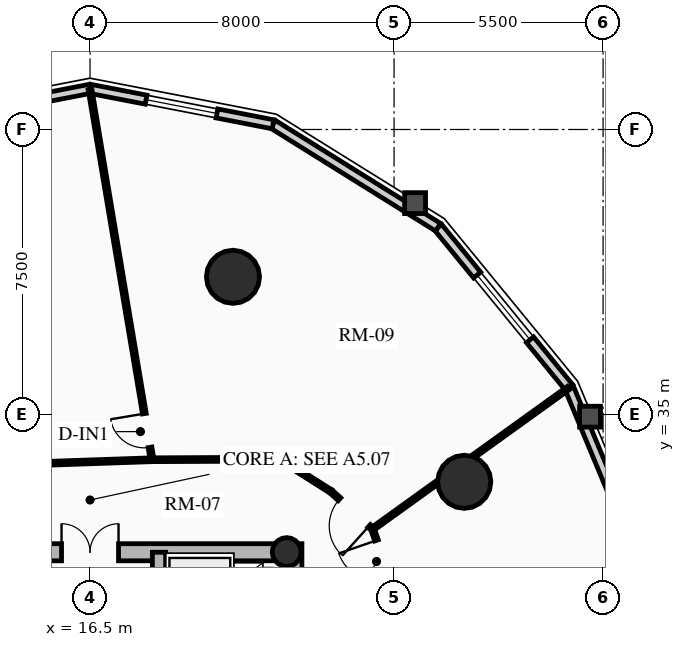
"""IFC4 building model, lengths in metres.
Left out: names, types, materials, properties, quantities, classifications, styles, units other than length and angle.
Written with IfcOpenShell. Run it as: python <this file> out.ifc"""

import sys

from ifc_helpers import new_model, si_unit, direction, frame, frame_2d, origin, origin_2d, place, context, subcontext, project, spatial, rectangle, circle, hollow_circle, extrude, source, transform, mapped, element, fill, save


model = new_model("IFC4")
c1 = context("Model", 3, precision=1e-05, world=origin(), true_north=direction((0.0, 1.0)))
c2 = subcontext(c1, "Body", "Model", "MODEL_VIEW")
j1 = project(units=[si_unit("LENGTHUNIT", "METRE"), si_unit("PLANEANGLEUNIT", "RADIAN")], contexts=[c1])
p1 = place(None, origin())
s1 = spatial("IfcSite", under=j1, at=p1, CompositionType="ELEMENT")
p2 = place(p1, origin())
s2 = spatial("IfcBuilding", under=s1, at=p2, CompositionType="ELEMENT")
p3 = place(p2, frame((0.0, 0.0, 99.25)))
s3 = spatial("IfcBuildingStorey", under=s2, at=p3, CompositionType="ELEMENT", Elevation=99.25)
p4 = place(p3, frame((21.85, 17.4, 0.0), z_axis=(0.0, 0.0, 1.0), x_axis=(0.0, 1.0, 0.0)))
e1 = element("IfcWall", 1, at=p4, inside=s3, PredefinedType="SHEAR", context=c2, shape_type="SweptSolid", body=[
    extrude(rectangle(XDim=14.2, YDim=0.45, at=frame_2d((7.1, 0.0))), origin(), (0.0, 0.0, 1.0), 2.91),
])
p5 = place(p3, frame((11.15, 31.375, 0.0), z_axis=(0.0, 0.0, 1.0), x_axis=(1.0, 0.0, 0.0)))
e2 = element("IfcWall", 2, at=p5, inside=s3, PredefinedType="SHEAR", context=c2, shape_type="SweptSolid", body=[
    extrude(rectangle(XDim=10.7, YDim=0.45, at=frame_2d((5.35, 0.0))), origin(), (0.0, 0.0, 1.0), 2.91),
])
m1 = source(origin(), c2, "Body", "SweptSolid", [
    extrude(rectangle(XDim=1.5, YDim=2.02, at=frame_2d((0.75, 1.01))), frame((0.0, 0.235, 0.0), z_axis=(0.0, -1.0, 0.0), x_axis=(1.0, 0.0, 0.0)), (0.0, 0.0, 1.0), 0.47),
])
p6 = place(p5, frame((4.6, 0.0, 0.0)))
e3 = element("IfcOpeningElement", 3, at=p6, cuts=e2, PredefinedType="OPENING", context=c2, shape_type="MappedRepresentation", body=[
    mapped(m1, transform((0.0, 0.0, 0.0), x_axis=(1.0, 0.0, 0.0), y_axis=(0.0, 1.0, 0.0), z_axis=(0.0, 0.0, 1.0), scale=1.0)),
])
p7 = place(p3, frame((18.315, 17.625, 0.0), z_axis=(0.0, 0.0, 1.0), x_axis=(0.0, 1.0, 0.0)))
e4 = element("IfcWall", 4, at=p7, inside=s3, PredefinedType="SHEAR", context=c2, shape_type="SweptSolid", body=[
    extrude(rectangle(XDim=13.75, YDim=0.35, at=frame_2d((6.875, 0.0))), origin(), (0.0, 0.0, 1.0), 2.91),
])
m2 = source(origin(), c2, "Body", "SweptSolid", [
    extrude(rectangle(XDim=1.1, YDim=2.015, at=frame_2d((0.55, 1.007))), frame((0.0, 0.185, 0.0), z_axis=(0.0, -1.0, 0.0), x_axis=(1.0, 0.0, 0.0)), (0.0, 0.0, 1.0), 0.37),
])
p8 = place(p7, frame((10.0, 0.0, 0.0)))
e5 = element("IfcOpeningElement", 5, at=p8, cuts=e4, PredefinedType="OPENING", context=c2, shape_type="MappedRepresentation", body=[
    mapped(m2, transform((0.0, 0.0, 0.0), x_axis=(1.0, 0.0, 0.0), y_axis=(0.0, 1.0, 0.0), z_axis=(0.0, 0.0, 1.0), scale=1.0)),
])
p9 = place(p7, frame((12.0, 0.0, 0.0)))
e6 = element("IfcOpeningElement", 6, at=p9, cuts=e4, PredefinedType="OPENING", context=c2, shape_type="MappedRepresentation", body=[
    mapped(m2, transform((0.0, 0.0, 0.0), x_axis=(1.0, 0.0, 0.0), y_axis=(0.0, 1.0, 0.0), z_axis=(0.0, 0.0, 1.0), scale=1.0)),
])
m3 = source(origin(), c2, "Body", "SweptSolid", [
    extrude(rectangle(XDim=1.15, YDim=2.02, at=frame_2d((0.575, 1.01))), frame((0.0, 0.185, 0.0), z_axis=(0.0, -1.0, 0.0), x_axis=(1.0, 0.0, 0.0)), (0.0, 0.0, 1.0), 0.37),
])
p10 = place(p7, frame((5.305, 0.0, 0.0)))
e7 = element("IfcOpeningElement", 7, at=p10, cuts=e4, PredefinedType="OPENING", context=c2, shape_type="MappedRepresentation", body=[
    mapped(m3, transform((0.0, 0.0, 0.0), x_axis=(1.0, 0.0, 0.0), y_axis=(0.0, 1.0, 0.0), z_axis=(0.0, 0.0, 1.0), scale=1.0)),
])
p11 = place(p3, frame((21.675, 31.38, 0.0), z_axis=(0.0, 0.0, 1.0), x_axis=(1.0, 0.0, 0.0)))
e8 = element("IfcColumn", 8, at=p11, inside=s3, PredefinedType="COLUMN", context=c2, shape_type="SweptSolid", body=[
    extrude(hollow_circle(Radius=0.38, WallThickness=0.032, at=origin_2d()), origin(), (0.0, 0.0, 1.0), 2.91),
])
for number, where, z_axis, x_axis in (
    (9, (26.347, 33.229, 0.0), (0.0, 0.0, 1.0), (1.0, 0.0, 0.0)),
    (10, (20.261, 38.623, 0.0), (0.0, 0.0, 1.0), (1.0, 0.0, 0.0)),
):
    element("IfcColumn", number, at=place(p3, frame(where, z_axis=z_axis, x_axis=x_axis)), inside=s3, PredefinedType="USERDEFINED", context=c2, shape_type="SweptSolid", body=[
        extrude(circle(Radius=0.7, at=origin_2d()), origin(), (0.0, 0.0, 1.0), 2.91),
    ])
p12 = place(p3, frame((29.105, 35.709, 0.0), z_axis=(0.0, 0.0, 1.0), x_axis=(0.384344417632, -0.923189779317, 0.0)))
e11 = element("IfcWall", 11, at=p12, inside=s3, PredefinedType="SOLIDWALL", context=c2, shape_type="SweptSolid", body=[
    extrude(rectangle(XDim=5.758, YDim=0.24, at=frame_2d((2.879, 0.0))), origin(), (0.0, 0.0, 1.0), 2.179),
])
p13 = place(p3, frame((25.658, 39.928, 0.0), z_axis=(0.0, 0.0, 1.0), x_axis=(0.632700781152, -0.77439635945, 0.0)))
e12 = element("IfcWall", 12, at=p13, inside=s3, PredefinedType="SOLIDWALL", context=c2, shape_type="SweptSolid", body=[
    extrude(rectangle(XDim=5.448, YDim=0.24, at=frame_2d((2.724, 0.0))), origin(), (0.0, 0.0, 1.0), 2.179),
])
m4 = source(origin(), c2, "Body", "SweptSolid", [
    extrude(rectangle(XDim=2.2, YDim=1.35, at=frame_2d((1.1, 0.675))), frame((0.0, 0.13, 0.0), z_axis=(0.0, -1.0, 0.0), x_axis=(1.0, 0.0, 0.0)), (0.0, 0.0, 1.0), 0.26),
])
p14 = place(p13, frame((1.624, 0.0, 0.65)))
e13 = element("IfcOpeningElement", 13, at=p14, cuts=e12, PredefinedType="OPENING", context=c2, shape_type="MappedRepresentation", body=[
    mapped(m4, transform((0.0, 0.0, 0.0), x_axis=(1.0, 0.0, 0.0), y_axis=(0.0, 1.0, 0.0), z_axis=(0.0, 0.0, 1.0), scale=1.0)),
])
p15 = place(p3, frame((21.315, 42.637, 0.0), z_axis=(0.0, 0.0, 1.0), x_axis=(0.848520380187, -0.529162701263, 0.0)))
e14 = element("IfcWall", 14, at=p15, inside=s3, PredefinedType="SOLIDWALL", context=c2, shape_type="SweptSolid", body=[
    extrude(rectangle(XDim=5.119, YDim=0.24, at=frame_2d((2.56, 0.0))), origin(), (0.0, 0.0, 1.0), 2.179),
])
p16 = place(p3, frame((16.5, 43.57, 0.0), z_axis=(0.0, 0.0, 1.0), x_axis=(0.981723785992, -0.190311344954, 0.0)))
e15 = element("IfcWall", 15, at=p16, inside=s3, PredefinedType="SOLIDWALL", context=c2, shape_type="SweptSolid", body=[
    extrude(rectangle(XDim=4.904, YDim=0.24, at=frame_2d((2.452, 0.0))), origin(), (0.0, 0.0, 1.0), 2.179),
])
m5 = source(origin(), c2, "Body", "SweptSolid", [
    extrude(rectangle(XDim=1.9, YDim=1.35, at=frame_2d((0.95, 0.675))), frame((0.0, 0.13, 0.0), z_axis=(0.0, -1.0, 0.0), x_axis=(1.0, 0.0, 0.0)), (0.0, 0.0, 1.0), 0.26),
])
p17 = place(p16, frame((1.502, 0.0, 0.65)))
e16 = element("IfcOpeningElement", 16, at=p17, cuts=e15, PredefinedType="OPENING", context=c2, shape_type="MappedRepresentation", body=[
    mapped(m5, transform((0.0, 0.0, 0.0), x_axis=(1.0, 0.0, 0.0), y_axis=(0.0, 1.0, 0.0), z_axis=(0.0, 0.0, 1.0), scale=1.0)),
])
p18 = place(p3, frame((11.685, 42.637, 0.0), z_axis=(0.0, 0.0, 1.0), x_axis=(0.981723785992, 0.190311344954, 0.0)))
e17 = element("IfcWall", 17, at=p18, inside=s3, PredefinedType="SOLIDWALL", context=c2, shape_type="SweptSolid", body=[
    extrude(rectangle(XDim=4.904, YDim=0.24, at=frame_2d((2.452, 0.0))), origin(), (0.0, 0.0, 1.0), 2.179),
])
p19 = place(p18, frame((1.352, 0.0, 0.65)))
e18 = element("IfcOpeningElement", 18, at=p19, cuts=e17, PredefinedType="OPENING", context=c2, shape_type="MappedRepresentation", body=[
    mapped(m4, transform((0.0, 0.0, 0.0), x_axis=(1.0, 0.0, 0.0), y_axis=(0.0, 1.0, 0.0), z_axis=(0.0, 0.0, 1.0), scale=1.0)),
])
p20 = place(p3, frame((24.42, 30.582, 0.0), z_axis=(0.0, 0.0, 1.0), x_axis=(-0.327437665675, 0.944872782494, 0.0)))
e19 = element("IfcWall", 19, at=p20, inside=s3, PredefinedType="MOVABLE", context=c2, shape_type="SweptSolid", body=[
    extrude(rectangle(XDim=1.487, YDim=0.1, at=frame_2d((0.743, 0.0))), origin(), (0.0, 0.0, 1.0), 2.225),
])
m6 = source(origin(), c2, "Body", "SweptSolid", [
    extrude(rectangle(XDim=1.05, YDim=2.015, at=frame_2d((0.525, 1.007))), frame((0.0, 0.06, 0.0), z_axis=(0.0, -1.0, 0.0), x_axis=(1.0, 0.0, 0.0)), (0.0, 0.0, 1.0), 0.12),
])
p21 = place(p20, frame((0.12, 0.0, 0.0)))
e20 = element("IfcOpeningElement", 20, at=p21, cuts=e19, PredefinedType="OPENING", context=c2, shape_type="MappedRepresentation", body=[
    mapped(m6, transform((0.0, 0.0, 0.0), x_axis=(1.0, 0.0, 0.0), y_axis=(0.0, 1.0, 0.0), z_axis=(0.0, 0.0, 1.0), scale=1.0)),
])
p22 = place(p3, frame((23.933, 31.987, 0.0), z_axis=(0.0, 0.0, 1.0), x_axis=(-0.742471347264, 0.669877823556, 0.0)))
e21 = element("IfcWall", 21, at=p22, inside=s3, PredefinedType="MOVABLE", context=c2, shape_type="SweptSolid", body=[
    extrude(rectangle(XDim=1.476, YDim=0.1, at=frame_2d((0.738, 0.0))), origin(), (0.0, 0.0, 1.0), 2.225),
])
p23 = place(p22, frame((0.12, 0.0, 0.0)))
e22 = element("IfcOpeningElement", 22, at=p23, cuts=e21, PredefinedType="OPENING", context=c2, shape_type="MappedRepresentation", body=[
    mapped(m6, transform((0.0, 0.0, 0.0), x_axis=(1.0, 0.0, 0.0), y_axis=(0.0, 1.0, 0.0), z_axis=(0.0, 0.0, 1.0), scale=1.0)),
])
p24 = place(p3, frame((22.837, 32.976, 0.0), z_axis=(0.0, 0.0, 1.0), x_axis=(-0.844976677144, 0.534803155454, 0.0)))
e23 = element("IfcWall", 23, at=p24, inside=s3, PredefinedType="MOVABLE", context=c2, shape_type="SweptSolid", body=[
    extrude(rectangle(XDim=1.587, YDim=0.1, at=frame_2d((0.793, 0.0))), origin(), (0.0, 0.0, 1.0), 2.225),
])
p25 = place(p3, frame((21.496, 33.824, 0.0), z_axis=(0.0, 0.0, 1.0), x_axis=(-0.999990516754, -0.004355043261, 0.0)))
e24 = element("IfcWall", 24, at=p25, inside=s3, PredefinedType="MOVABLE", context=c2, shape_type="SweptSolid", body=[
    extrude(rectangle(XDim=3.364, YDim=0.1, at=frame_2d((1.682, 0.0))), origin(), (0.0, 0.0, 1.0), 2.225),
])
p26 = place(p3, frame((18.133, 33.81, 0.0), z_axis=(0.0, 0.0, 1.0), x_axis=(-0.999415793323, -0.03417706916, 0.0)))
e25 = element("IfcWall", 25, at=p26, inside=s3, PredefinedType="MOVABLE", context=c2, shape_type="SweptSolid", body=[
    extrude(rectangle(XDim=6.486, YDim=0.1, at=frame_2d((3.243, 0.0))), origin(), (0.0, 0.0, 1.0), 2.225),
])
p27 = place(p3, frame((23.933, 31.987, 0.0), z_axis=(0.0, 0.0, 1.0), x_axis=(0.811642946178, 0.584153856377, 0.0)))
e26 = element("IfcWall", 26, at=p27, inside=s3, PredefinedType="MOVABLE", context=c2, shape_type="SweptSolid", body=[
    extrude(rectangle(XDim=6.352, YDim=0.1, at=frame_2d((3.176, 0.0))), origin(), (0.0, 0.0, 1.0), 2.179),
])
p28 = place(p3, frame((18.133, 33.81, 0.0), z_axis=(0.0, 0.0, 1.0), x_axis=(-0.165324898919, 0.98623915852, 0.0)))
e27 = element("IfcWall", 27, at=p28, inside=s3, PredefinedType="MOVABLE", context=c2, shape_type="SweptSolid", body=[
    extrude(rectangle(XDim=9.876, YDim=0.1, at=frame_2d((4.938, 0.0))), origin(), (0.0, 0.0, 1.0), 2.179),
])
m7 = source(origin(), c2, "Body", "SweptSolid", [
    extrude(rectangle(XDim=0.9, YDim=2.005, at=frame_2d((0.45, 1.002))), frame((0.0, 0.06, 0.0), z_axis=(0.0, -1.0, 0.0), x_axis=(1.0, 0.0, 0.0)), (0.0, 0.0, 1.0), 0.12),
])
p29 = place(p28, frame((0.33, 0.0, 0.0)))
e28 = element("IfcOpeningElement", 28, at=p29, cuts=e27, PredefinedType="OPENING", context=c2, shape_type="MappedRepresentation", body=[
    mapped(m7, transform((0.0, 0.0, 0.0), x_axis=(1.0, 0.0, 0.0), y_axis=(0.0, 1.0, 0.0), z_axis=(0.0, 0.0, 1.0), scale=1.0)),
])
m8 = source(origin(), c2, "Body", "SweptSolid", [
    extrude(rectangle(XDim=2.2, YDim=1.35, at=frame_2d((1.1, 0.675))), frame((0.0, 0.03, 0.0), z_axis=(0.0, -1.0, 0.0), x_axis=(1.0, 0.0, 0.0)), (0.0, 0.0, 1.0), 0.06),
])
p30 = place(p14, origin())
e29 = element("IfcWindow", 29, at=p30, inside=s3, PartitioningType="DOUBLE_PANEL_VERTICAL", PredefinedType="WINDOW", context=c2, shape_type="MappedRepresentation", body=[
    mapped(m8, transform((0.0, 0.0, 0.0), x_axis=(1.0, 0.0, 0.0), y_axis=(0.0, 1.0, 0.0), z_axis=(0.0, 0.0, 1.0), scale=1.0)),
])
fill(e13, e29)
m9 = source(origin(), c2, "Body", "SweptSolid", [
    extrude(rectangle(XDim=1.9, YDim=1.35, at=frame_2d((0.95, 0.675))), frame((0.0, 0.03, 0.0), z_axis=(0.0, -1.0, 0.0), x_axis=(1.0, 0.0, 0.0)), (0.0, 0.0, 1.0), 0.06),
])
p31 = place(p17, origin())
e30 = element("IfcWindow", 30, at=p31, inside=s3, PartitioningType="DOUBLE_PANEL_VERTICAL", PredefinedType="WINDOW", context=c2, shape_type="MappedRepresentation", body=[
    mapped(m9, transform((0.0, 0.0, 0.0), x_axis=(1.0, 0.0, 0.0), y_axis=(0.0, 1.0, 0.0), z_axis=(0.0, 0.0, 1.0), scale=1.0)),
])
fill(e16, e30)
m10 = source(origin(), c2, "Body", "SweptSolid", [
    extrude(rectangle(XDim=1.5, YDim=2.02, at=frame_2d((0.75, 1.01))), frame((0.0, 0.025, 0.0), z_axis=(0.0, -1.0, 0.0), x_axis=(1.0, 0.0, 0.0)), (0.0, 0.0, 1.0), 0.05),
])
p32 = place(p6, origin())
e31 = element("IfcDoor", 31, at=p32, inside=s3, OperationType="DOUBLE_DOOR_SINGLE_SWING", PredefinedType="DOOR", context=c2, shape_type="MappedRepresentation", body=[
    mapped(m10, transform((0.0, 0.0, 0.0), x_axis=(1.0, 0.0, 0.0), y_axis=(0.0, 1.0, 0.0), z_axis=(0.0, 0.0, 1.0), scale=1.0)),
])
fill(e3, e31)
m11 = source(origin(), c2, "Body", "SweptSolid", [
    extrude(rectangle(XDim=1.05, YDim=2.015, at=frame_2d((0.525, 1.007))), frame((0.0, 0.025, 0.0), z_axis=(0.0, -1.0, 0.0), x_axis=(1.0, 0.0, 0.0)), (0.0, 0.0, 1.0), 0.05),
])
p33 = place(p21, origin())
e32 = element("IfcDoor", 32, at=p33, inside=s3, OperationType="SINGLE_SWING_RIGHT", PredefinedType="DOOR", context=c2, shape_type="MappedRepresentation", body=[
    mapped(m11, transform((0.0, 0.0, 0.0), x_axis=(1.0, 0.0, 0.0), y_axis=(0.0, 1.0, 0.0), z_axis=(0.0, 0.0, 1.0), scale=1.0)),
])
fill(e20, e32)
p34 = place(p23, origin())
e33 = element("IfcDoor", 33, at=p34, inside=s3, OperationType="SINGLE_SWING_LEFT", PredefinedType="DOOR", context=c2, shape_type="MappedRepresentation", body=[
    mapped(m11, transform((0.0, 0.0, 0.0), x_axis=(1.0, 0.0, 0.0), y_axis=(0.0, 1.0, 0.0), z_axis=(0.0, 0.0, 1.0), scale=1.0)),
])
fill(e22, e33)
m12 = source(origin(), c2, "Body", "SweptSolid", [
    extrude(rectangle(XDim=0.9, YDim=2.005, at=frame_2d((0.45, 1.002))), frame((0.0, 0.025, 0.0), z_axis=(0.0, -1.0, 0.0), x_axis=(1.0, 0.0, 0.0)), (0.0, 0.0, 1.0), 0.05),
])
p35 = place(p29, origin())
e34 = element("IfcDoor", 34, at=p35, inside=s3, OperationType="SINGLE_SWING_RIGHT", PredefinedType="DOOR", context=c2, shape_type="MappedRepresentation", body=[
    mapped(m12, transform((0.0, 0.0, 0.0), x_axis=(1.0, 0.0, 0.0), y_axis=(0.0, 1.0, 0.0), z_axis=(0.0, 0.0, 1.0), scale=1.0)),
])
fill(e28, e34)
save(model, sys.argv[1])
